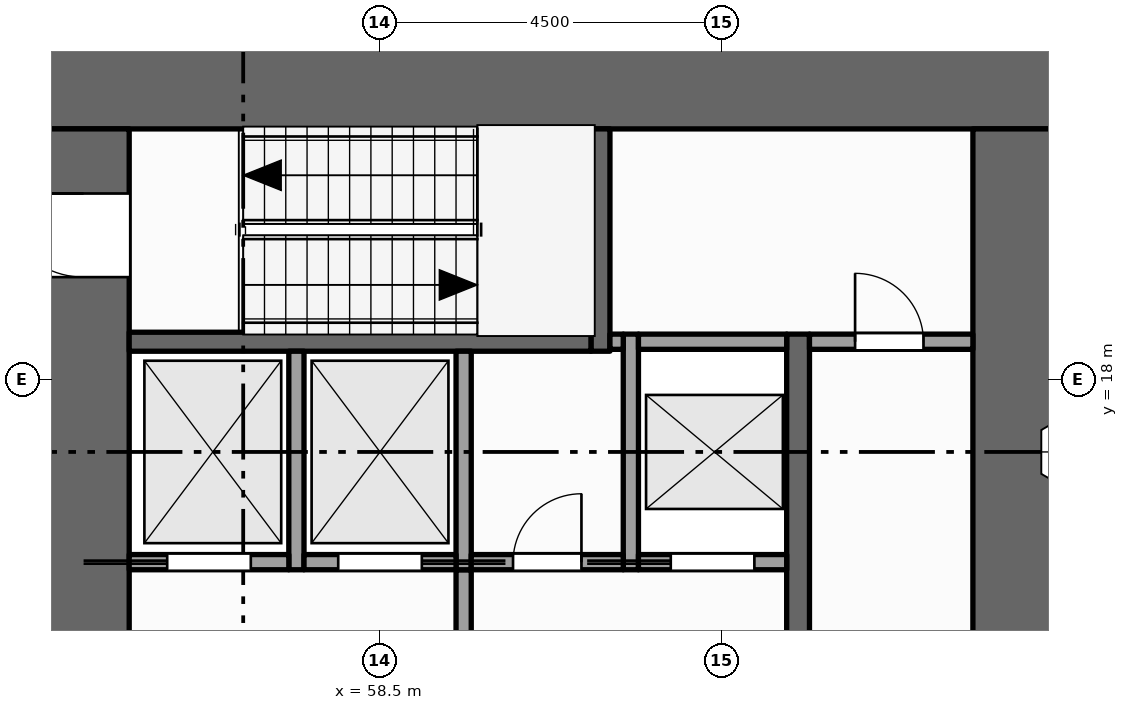
"""IFC4 building model, lengths in metres.
Left out: names, types, materials, properties, quantities, classifications, styles, units other than length and angle.
Written with IfcOpenShell. Run it as: python <this file> out.ifc"""

import sys

from ifc_helpers import new_model, si_unit, direction, frame, frame_2d, origin, place, context, subcontext, project, spatial, rectangle, extrude, element, fill, save


model = new_model("IFC4")
c1 = context("Model", 3, precision=1e-05, world=origin(), true_north=direction((0.0, 1.0)))
c2 = subcontext(c1, "Body", "Model", "MODEL_VIEW")
j1 = project(units=[si_unit("LENGTHUNIT", "METRE"), si_unit("PLANEANGLEUNIT", "RADIAN")], contexts=[c1])
p1 = place(None, origin())
s1 = spatial("IfcSite", under=j1, at=p1, CompositionType="ELEMENT")
p2 = place(p1, origin())
s2 = spatial("IfcBuilding", under=s1, at=p2, CompositionType="ELEMENT")
p3 = place(p2, frame((0.0, 0.0, 57.0)))
s3 = spatial("IfcBuildingStorey", under=s2, at=p3, CompositionType="ELEMENT", Elevation=57.0)
p4 = place(p3, frame((54.0, 21.9, -0.15), z_axis=(0.0, 0.0, 1.0), x_axis=(1.0, 0.0, 0.0)))
e1 = element("IfcWall", 1, at=p4, inside=s3, PredefinedType="SHEAR", context=c2, shape_type="SweptSolid", body=[
    extrude(rectangle(XDim=13.5, YDim=1.2, at=frame_2d((6.75, 0.0))), origin(), (0.0, 0.0, 1.0), 4.0),
])
p5 = place(p3, frame((54.6, 1.2, -0.15), z_axis=(0.0, 0.0, 1.0), x_axis=(0.0, 1.0, 0.0)))
e2 = element("IfcWall", 2, at=p5, inside=s3, PredefinedType="SHEAR", context=c2, shape_type="SweptSolid", body=[
    extrude(rectangle(XDim=20.1, YDim=1.2, at=frame_2d((10.05, 0.0))), origin(), (0.0, 0.0, 1.0), 4.0),
])
p6 = place(p5, frame((5.9, 0.0, 0.15)))
e3 = element("IfcOpeningElement", 3, at=p6, cuts=e2, PredefinedType="OPENING", context=c2, shape_type="SweptSolid", body=[
    extrude(rectangle(XDim=1.8, YDim=2.1, at=frame_2d((0.9, 1.05))), frame((0.0, 0.61, 0.0), z_axis=(0.0, -1.0, 0.0), x_axis=(1.0, 0.0, 0.0)), (0.0, 0.0, 1.0), 1.22),
])
p7 = place(p5, frame((11.95, 0.0, 0.15)))
e4 = element("IfcOpeningElement", 4, at=p7, cuts=e2, PredefinedType="OPENING", context=c2, shape_type="SweptSolid", body=[
    extrude(rectangle(XDim=1.1, YDim=2.1, at=frame_2d((0.55, 1.05))), frame((0.0, 0.61, 0.0), z_axis=(0.0, -1.0, 0.0), x_axis=(1.0, 0.0, 0.0)), (0.0, 0.0, 1.0), 1.22),
])
p8 = place(p5, frame((0.95, 0.0, 0.15)))
e5 = element("IfcOpeningElement", 5, at=p8, cuts=e2, PredefinedType="OPENING", context=c2, shape_type="SweptSolid", body=[
    extrude(rectangle(XDim=1.1, YDim=2.1, at=frame_2d((0.55, 1.05))), frame((0.0, 0.61, 0.0), z_axis=(0.0, -1.0, 0.0), x_axis=(1.0, 0.0, 0.0)), (0.0, 0.0, 1.0), 1.22),
])
p9 = place(p5, frame((18.15, 0.0, 0.15)))
e6 = element("IfcOpeningElement", 6, at=p9, cuts=e2, PredefinedType="OPENING", context=c2, shape_type="SweptSolid", body=[
    extrude(rectangle(XDim=1.1, YDim=2.1, at=frame_2d((0.55, 1.05))), frame((0.0, 0.61, 0.0), z_axis=(0.0, -1.0, 0.0), x_axis=(1.0, 0.0, 0.0)), (0.0, 0.0, 1.0), 1.22),
])
p10 = place(p3, frame((66.9, 1.2, -0.15), z_axis=(0.0, 0.0, 1.0), x_axis=(0.0, 1.0, 0.0)))
e7 = element("IfcWall", 7, at=p10, inside=s3, PredefinedType="SHEAR", context=c2, shape_type="SweptSolid", body=[
    extrude(rectangle(XDim=20.1, YDim=1.2, at=frame_2d((10.05, 0.0))), origin(), (0.0, 0.0, 1.0), 4.0),
])
p11 = place(p3, frame((57.4, 15.5, 0.0), z_axis=(0.0, 0.0, 1.0), x_axis=(0.0, 1.0, 0.0)))
e8 = element("IfcWall", 8, at=p11, inside=s3, PredefinedType="SOLIDWALL", context=c2, shape_type="SweptSolid", body=[
    extrude(rectangle(XDim=2.875, YDim=0.2, at=frame_2d((1.438, 0.0))), origin(), (0.0, 0.0, 1.0), 3.85),
])
p12 = place(p3, frame((59.6, 11.7, 0.0), z_axis=(0.0, 0.0, 1.0), x_axis=(0.0, 1.0, 0.0)))
e9 = element("IfcWall", 9, at=p12, inside=s3, PredefinedType="PARTITIONING", context=c2, shape_type="SweptSolid", body=[
    extrude(rectangle(XDim=3.8, YDim=0.2, at=frame_2d((1.9, 0.0))), origin(), (0.0, 0.0, 1.0), 3.85),
])
p13 = place(p12, frame((1.5, 0.0, 0.0)))
e10 = element("IfcOpeningElement", 10, at=p13, cuts=e9, PredefinedType="OPENING", context=c2, shape_type="SweptSolid", body=[
    extrude(rectangle(XDim=1.0, YDim=2.1, at=frame_2d((0.5, 1.05))), frame((0.0, 0.11, 0.0), z_axis=(0.0, -1.0, 0.0), x_axis=(1.0, 0.0, 0.0)), (0.0, 0.0, 1.0), 0.22),
])
p14 = place(p3, frame((59.6, 15.5, 0.0), z_axis=(0.0, 0.0, 1.0), x_axis=(0.0, 1.0, 0.0)))
e11 = element("IfcWall", 11, at=p14, inside=s3, PredefinedType="SOLIDWALL", context=c2, shape_type="SweptSolid", body=[
    extrude(rectangle(XDim=2.875, YDim=0.2, at=frame_2d((1.438, 0.0))), origin(), (0.0, 0.0, 1.0), 3.85),
])
p15 = place(p3, frame((61.4, 18.375, 0.0), z_axis=(0.0, 0.0, 1.0), x_axis=(0.0, 1.0, 0.0)))
e12 = element("IfcWall", 12, at=p15, inside=s3, PredefinedType="SHEAR", context=c2, shape_type="SweptSolid", body=[
    extrude(rectangle(XDim=2.925, YDim=0.25, at=frame_2d((1.462, 0.0))), origin(), (0.0, 0.0, 1.0), 3.85),
])
p16 = place(p3, frame((61.8, 15.5, 0.0), z_axis=(0.0, 0.0, 1.0), x_axis=(0.0, 1.0, 0.0)))
e13 = element("IfcWall", 13, at=p16, inside=s3, PredefinedType="SOLIDWALL", context=c2, shape_type="SweptSolid", body=[
    extrude(rectangle(XDim=3.1, YDim=0.2, at=frame_2d((1.55, 0.0))), origin(), (0.0, 0.0, 1.0), 3.85),
])
p17 = place(p3, frame((64.0, 4.1, 0.0), z_axis=(0.0, 0.0, 1.0), x_axis=(0.0, 1.0, 0.0)))
e14 = element("IfcWall", 14, at=p17, inside=s3, PredefinedType="SHEAR", context=c2, shape_type="SweptSolid", body=[
    extrude(rectangle(XDim=14.5, YDim=0.3, at=frame_2d((7.25, 0.0))), origin(), (0.0, 0.0, 1.0), 3.85),
])
p18 = place(p17, frame((3.4, 0.0, 0.0)))
e15 = element("IfcOpeningElement", 15, at=p18, cuts=e14, PredefinedType="OPENING", context=c2, shape_type="SweptSolid", body=[
    extrude(rectangle(XDim=1.0, YDim=2.1, at=frame_2d((0.5, 1.05))), frame((0.0, 0.16, 0.0), z_axis=(0.0, -1.0, 0.0), x_axis=(1.0, 0.0, 0.0)), (0.0, 0.0, 1.0), 0.32),
])
p19 = place(p17, frame((9.1, 0.0, 0.0)))
e16 = element("IfcOpeningElement", 16, at=p19, cuts=e14, PredefinedType="OPENING", context=c2, shape_type="SweptSolid", body=[
    extrude(rectangle(XDim=1.0, YDim=2.1, at=frame_2d((0.5, 1.05))), frame((0.0, 0.16, 0.0), z_axis=(0.0, -1.0, 0.0), x_axis=(1.0, 0.0, 0.0)), (0.0, 0.0, 1.0), 0.32),
])
p20 = place(p3, frame((55.2, 15.6, 0.0), z_axis=(0.0, 0.0, 1.0), x_axis=(1.0, 0.0, 0.0)))
e17 = element("IfcWall", 17, at=p20, inside=s3, PredefinedType="SOLIDWALL", context=c2, shape_type="SweptSolid", body=[
    extrude(rectangle(XDim=2.1, YDim=0.2, at=frame_2d((1.05, 0.0))), origin(), (0.0, 0.0, 1.0), 3.85),
])
p21 = place(p20, frame((0.5, 0.0, 0.012)))
e18 = element("IfcOpeningElement", 18, at=p21, cuts=e17, PredefinedType="OPENING", context=c2, shape_type="SweptSolid", body=[
    extrude(rectangle(XDim=1.1, YDim=2.1, at=frame_2d((0.55, 1.05))), frame((0.0, 0.11, 0.0), z_axis=(0.0, -1.0, 0.0), x_axis=(1.0, 0.0, 0.0)), (0.0, 0.0, 1.0), 0.22),
])
p22 = place(p3, frame((57.5, 15.6, 0.0), z_axis=(0.0, 0.0, 1.0), x_axis=(1.0, 0.0, 0.0)))
e19 = element("IfcWall", 19, at=p22, inside=s3, PredefinedType="SOLIDWALL", context=c2, shape_type="SweptSolid", body=[
    extrude(rectangle(XDim=2.0, YDim=0.2, at=frame_2d((1.0, 0.0))), origin(), (0.0, 0.0, 1.0), 3.85),
])
p23 = place(p22, frame((0.45, 0.0, 0.012)))
e20 = element("IfcOpeningElement", 20, at=p23, cuts=e19, PredefinedType="OPENING", context=c2, shape_type="SweptSolid", body=[
    extrude(rectangle(XDim=1.1, YDim=2.1, at=frame_2d((0.55, 1.05))), frame((0.0, 0.11, 0.0), z_axis=(0.0, -1.0, 0.0), x_axis=(1.0, 0.0, 0.0)), (0.0, 0.0, 1.0), 0.22),
])
p24 = place(p3, frame((59.7, 15.6, 0.0), z_axis=(0.0, 0.0, 1.0), x_axis=(1.0, 0.0, 0.0)))
e21 = element("IfcWall", 21, at=p24, inside=s3, PredefinedType="PARTITIONING", context=c2, shape_type="SweptSolid", body=[
    extrude(rectangle(XDim=2.0, YDim=0.2, at=frame_2d((1.0, 0.0))), origin(), (0.0, 0.0, 1.0), 3.85),
])
p25 = place(p24, frame((0.55, 0.0, 0.0)))
e22 = element("IfcOpeningElement", 22, at=p25, cuts=e21, PredefinedType="OPENING", context=c2, shape_type="SweptSolid", body=[
    extrude(rectangle(XDim=0.9, YDim=2.1, at=frame_2d((0.45, 1.05))), frame((0.0, 0.11, 0.0), z_axis=(0.0, -1.0, 0.0), x_axis=(1.0, 0.0, 0.0)), (0.0, 0.0, 1.0), 0.22),
])
p26 = place(p3, frame((61.9, 15.6, 0.0), z_axis=(0.0, 0.0, 1.0), x_axis=(1.0, 0.0, 0.0)))
e23 = element("IfcWall", 23, at=p26, inside=s3, PredefinedType="SOLIDWALL", context=c2, shape_type="SweptSolid", body=[
    extrude(rectangle(XDim=1.95, YDim=0.2, at=frame_2d((0.975, 0.0))), origin(), (0.0, 0.0, 1.0), 3.85),
])
p27 = place(p26, frame((0.425, 0.0, 0.012)))
e24 = element("IfcOpeningElement", 24, at=p27, cuts=e23, PredefinedType="OPENING", context=c2, shape_type="SweptSolid", body=[
    extrude(rectangle(XDim=1.1, YDim=2.1, at=frame_2d((0.55, 1.05))), frame((0.0, 0.11, 0.0), z_axis=(0.0, -1.0, 0.0), x_axis=(1.0, 0.0, 0.0)), (0.0, 0.0, 1.0), 0.22),
])
p28 = place(p3, frame((55.2, 18.5, 0.0), z_axis=(0.0, 0.0, 1.0), x_axis=(1.0, 0.0, 0.0)))
e25 = element("IfcWall", 25, at=p28, inside=s3, PredefinedType="SHEAR", context=c2, shape_type="SweptSolid", body=[
    extrude(rectangle(XDim=6.075, YDim=0.25, at=frame_2d((3.038, 0.0))), origin(), (0.0, 0.0, 1.0), 3.85),
])
p29 = place(p3, frame((61.525, 18.5, 0.0), z_axis=(0.0, 0.0, 1.0), x_axis=(1.0, 0.0, 0.0)))
e26 = element("IfcWall", 26, at=p29, inside=s3, PredefinedType="PARTITIONING", context=c2, shape_type="SweptSolid", body=[
    extrude(rectangle(XDim=0.175, YDim=0.2, at=frame_2d((0.087, 0.0))), origin(), (0.0, 0.0, 1.0), 3.85),
])
p30 = place(p3, frame((61.9, 18.5, 0.0), z_axis=(0.0, 0.0, 1.0), x_axis=(1.0, 0.0, 0.0)))
e27 = element("IfcWall", 27, at=p30, inside=s3, PredefinedType="SOLIDWALL", context=c2, shape_type="SweptSolid", body=[
    extrude(rectangle(XDim=1.95, YDim=0.2, at=frame_2d((0.975, 0.0))), origin(), (0.0, 0.0, 1.0), 3.85),
])
p31 = place(p3, frame((64.15, 18.5, 0.0), z_axis=(0.0, 0.0, 1.0), x_axis=(1.0, 0.0, 0.0)))
e28 = element("IfcWall", 28, at=p31, inside=s3, PredefinedType="PARTITIONING", context=c2, shape_type="SweptSolid", body=[
    extrude(rectangle(XDim=2.15, YDim=0.2, at=frame_2d((1.075, 0.0))), origin(), (0.0, 0.0, 1.0), 3.85),
])
p32 = place(p31, frame((0.6, 0.0, 0.0)))
e29 = element("IfcOpeningElement", 29, at=p32, cuts=e28, PredefinedType="OPENING", context=c2, shape_type="SweptSolid", body=[
    extrude(rectangle(XDim=0.9, YDim=2.1, at=frame_2d((0.45, 1.05))), frame((0.0, 0.11, 0.0), z_axis=(0.0, -1.0, 0.0), x_axis=(1.0, 0.0, 0.0)), (0.0, 0.0, 1.0), 0.22),
])
p33 = place(p21, origin())
e30 = element("IfcDoor", 30, at=p33, inside=s3, OperationType="SLIDING_TO_LEFT", PredefinedType="DOOR", context=c2, shape_type="SweptSolid", body=[
    extrude(rectangle(XDim=1.1, YDim=2.1, at=frame_2d((0.55, 1.05))), frame((0.0, 0.025, 0.0), z_axis=(0.0, -1.0, 0.0), x_axis=(1.0, 0.0, 0.0)), (0.0, 0.0, 1.0), 0.05),
])
fill(e18, e30)
p34 = place(p23, origin())
e31 = element("IfcDoor", 31, at=p34, inside=s3, OperationType="SLIDING_TO_RIGHT", PredefinedType="DOOR", context=c2, shape_type="SweptSolid", body=[
    extrude(rectangle(XDim=1.1, YDim=2.1, at=frame_2d((0.55, 1.05))), frame((0.0, 0.025, 0.0), z_axis=(0.0, -1.0, 0.0), x_axis=(1.0, 0.0, 0.0)), (0.0, 0.0, 1.0), 0.05),
])
fill(e20, e31)
p35 = place(p27, origin())
e32 = element("IfcDoor", 32, at=p35, inside=s3, OperationType="SLIDING_TO_LEFT", PredefinedType="DOOR", context=c2, shape_type="SweptSolid", body=[
    extrude(rectangle(XDim=1.1, YDim=2.1, at=frame_2d((0.55, 1.05))), frame((0.0, 0.025, 0.0), z_axis=(0.0, -1.0, 0.0), x_axis=(1.0, 0.0, 0.0)), (0.0, 0.0, 1.0), 0.05),
])
fill(e24, e32)
p36 = place(p9, origin())
e33 = element("IfcDoor", 33, at=p36, inside=s3, OperationType="SINGLE_SWING_RIGHT", PredefinedType="DOOR", context=c2, shape_type="SweptSolid", body=[
    extrude(rectangle(XDim=1.1, YDim=2.1, at=frame_2d((0.55, 1.05))), frame((0.0, 0.025, 0.0), z_axis=(0.0, -1.0, 0.0), x_axis=(1.0, 0.0, 0.0)), (0.0, 0.0, 1.0), 0.05),
])
fill(e6, e33)
p37 = place(p32, origin())
e34 = element("IfcDoor", 34, at=p37, inside=s3, OperationType="SINGLE_SWING_LEFT", PredefinedType="DOOR", context=c2, shape_type="SweptSolid", body=[
    extrude(rectangle(XDim=0.9, YDim=2.1, at=frame_2d((0.45, 1.05))), frame((0.0, 0.025, 0.0), z_axis=(0.0, -1.0, 0.0), x_axis=(1.0, 0.0, 0.0)), (0.0, 0.0, 1.0), 0.05),
])
fill(e29, e34)
p38 = place(p25, origin())
e35 = element("IfcDoor", 35, at=p38, inside=s3, OperationType="SINGLE_SWING_RIGHT", PredefinedType="DOOR", context=c2, shape_type="SweptSolid", body=[
    extrude(rectangle(XDim=0.9, YDim=2.1, at=frame_2d((0.45, 1.05))), frame((0.0, 0.025, 0.0), z_axis=(0.0, -1.0, 0.0), x_axis=(1.0, 0.0, 0.0)), (0.0, 0.0, 1.0), 0.05),
])
fill(e22, e35)
save(model, sys.argv[1])
